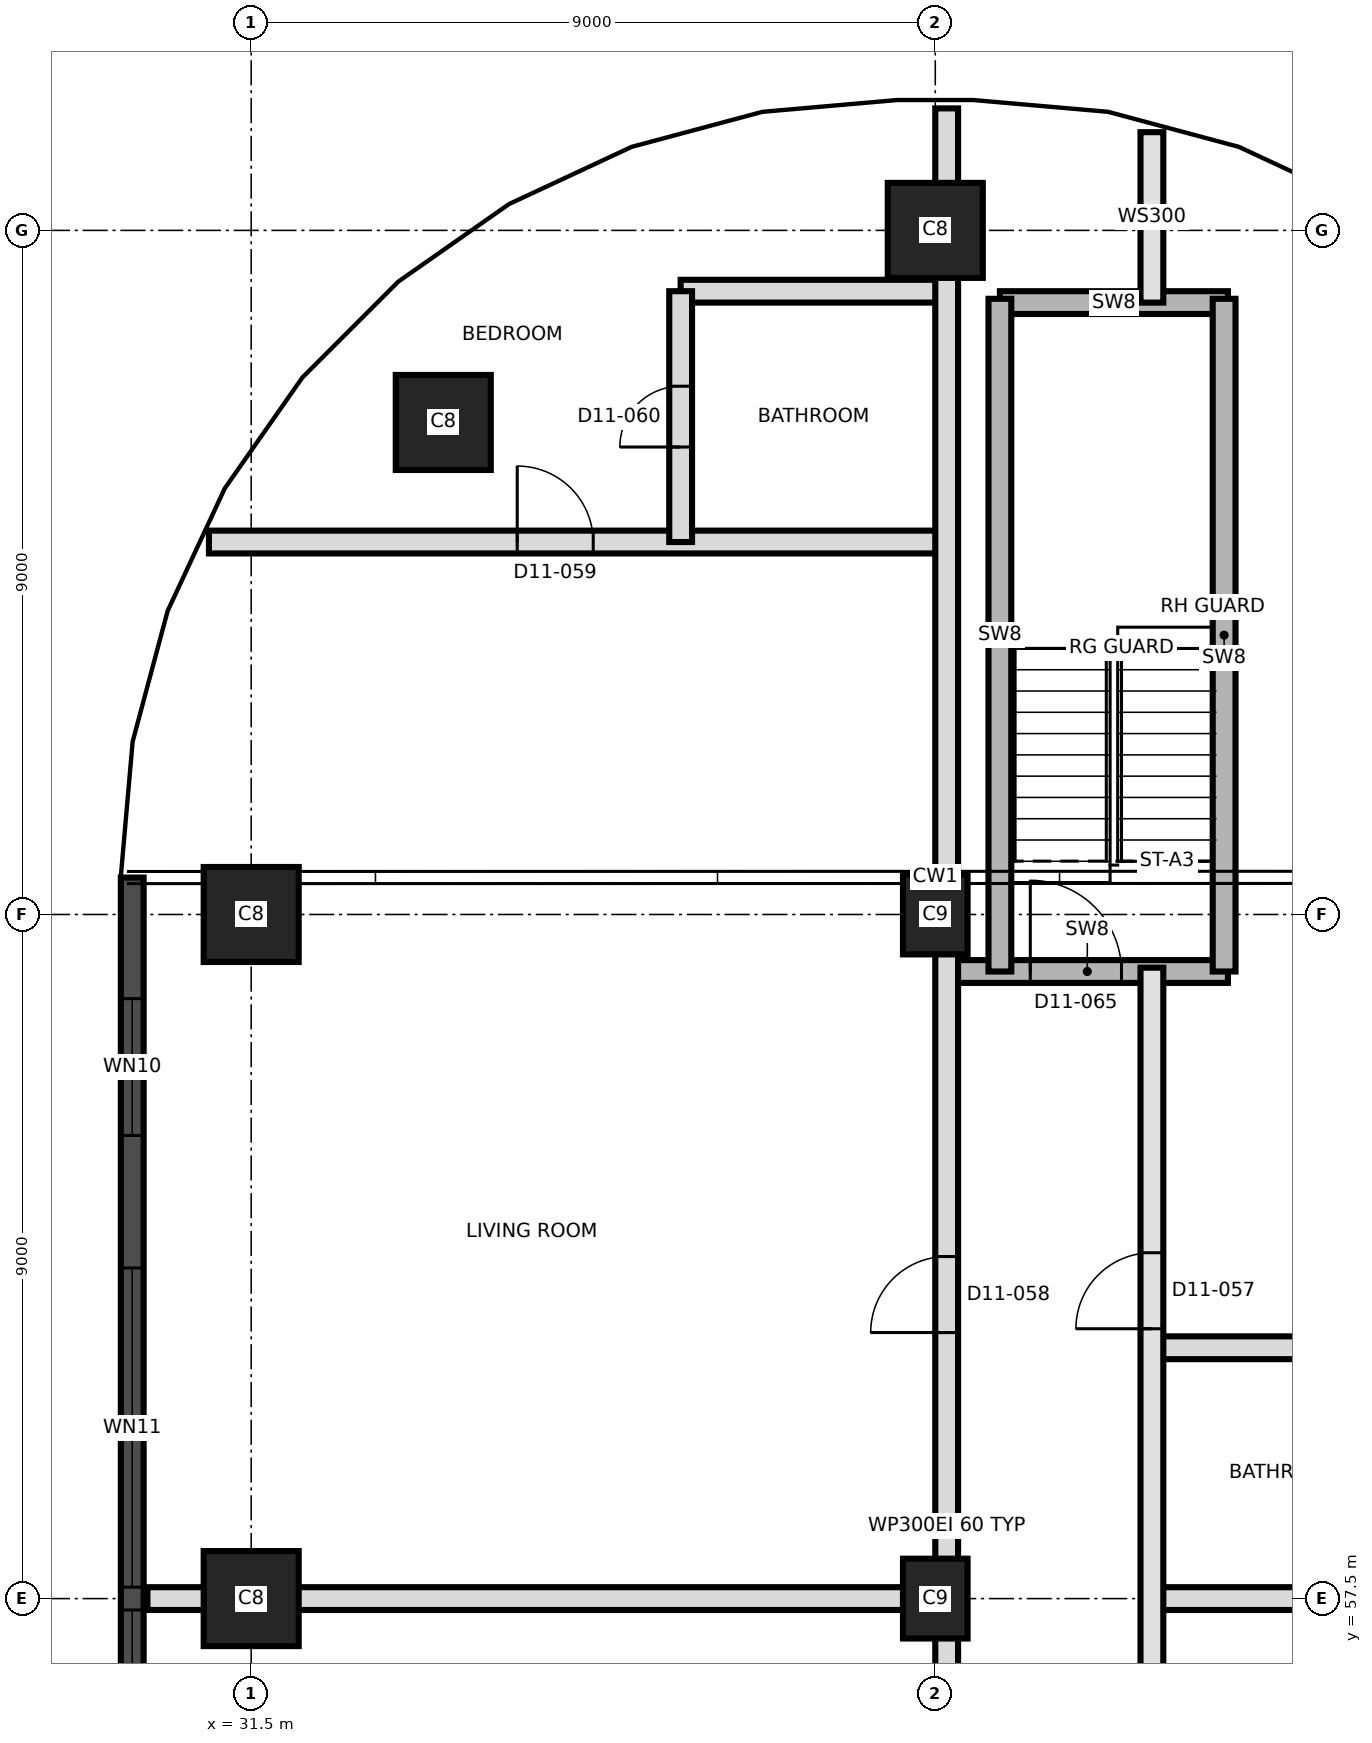
"""IFC4 building model, lengths in metres.
Left out: names, types, materials, properties, quantities, classifications, styles, units other than length and angle.
Written with IfcOpenShell. Run it as: python <this file> out.ifc"""

import sys

from ifc_helpers import new_model, si_unit, direction, frame, frame_2d, origin, origin_2d, place, context, subcontext, project, spatial, rectangle, extrude, element, fill, save


model = new_model("IFC4")
c1 = context("Model", 3, precision=1e-05, world=origin(), true_north=direction((0.0, 1.0)))
c2 = subcontext(c1, "Body", "Model", "MODEL_VIEW")
j1 = project(units=[si_unit("LENGTHUNIT", "METRE"), si_unit("PLANEANGLEUNIT", "RADIAN")], contexts=[c1])
p1 = place(None, origin())
s1 = spatial("IfcSite", under=j1, at=p1, CompositionType="ELEMENT")
p2 = place(p1, origin())
s2 = spatial("IfcBuilding", under=s1, at=p2, CompositionType="ELEMENT")
p3 = place(p2, frame((0.0, 0.0, 131.5)))
s3 = spatial("IfcBuildingStorey", under=s2, at=p3, CompositionType="ELEMENT", Elevation=131.5)
p4 = place(p3, frame((31.5, 57.5, 0.0), z_axis=(0.0, 0.0, 1.0), x_axis=(1.0, 0.0, 0.0)))
e1 = element("IfcColumn", 1, at=p4, inside=s3, PredefinedType="COLUMN", context=c2, shape_type="SweptSolid", body=[
    extrude(rectangle(XDim=1.25, YDim=1.25, at=origin_2d()), origin(), (0.0, 0.0, 1.0), 3.7),
])
p5 = place(p3, frame((40.5, 57.5, 0.0), z_axis=(0.0, 0.0, 1.0), x_axis=(0.0, 1.0, 0.0)))
e2 = element("IfcColumn", 2, at=p5, inside=s3, PredefinedType="COLUMN", context=c2, shape_type="SweptSolid", body=[
    extrude(rectangle(XDim=1.05, YDim=0.85, at=origin_2d()), origin(), (0.0, 0.0, 1.0), 3.7),
])
p6 = place(p3, frame((31.5, 66.5, 0.0), z_axis=(0.0, 0.0, 1.0), x_axis=(1.0, 0.0, 0.0)))
e3 = element("IfcColumn", 3, at=p6, inside=s3, PredefinedType="COLUMN", context=c2, shape_type="SweptSolid", body=[
    extrude(rectangle(XDim=1.25, YDim=1.25, at=origin_2d()), origin(), (0.0, 0.0, 1.0), 3.7),
])
p7 = place(p3, frame((40.5, 66.5, 0.0), z_axis=(0.0, 0.0, 1.0), x_axis=(0.0, 1.0, 0.0)))
e4 = element("IfcColumn", 4, at=p7, inside=s3, PredefinedType="COLUMN", context=c2, shape_type="SweptSolid", body=[
    extrude(rectangle(XDim=1.05, YDim=0.85, at=origin_2d()), origin(), (0.0, 0.0, 1.0), 3.7),
])
for number, where, z_axis, x_axis in (
    (5, (34.027, 72.973, 0.0), (0.0, 0.0, 1.0), (1.0, 0.0, 0.0)),
    (6, (40.5, 75.5, 0.0), (0.0, 0.0, 1.0), (1.0, 0.0, 0.0)),
):
    element("IfcColumn", number, at=place(p3, frame(where, z_axis=z_axis, x_axis=x_axis)), inside=s3, PredefinedType="COLUMN", context=c2, shape_type="SweptSolid", body=[
        extrude(rectangle(XDim=1.25, YDim=1.25, at=origin_2d()), origin(), (0.0, 0.0, 1.0), 3.7),
    ])
p8 = place(p3, frame((29.935, 66.986, 0.0), z_axis=(0.0, 0.0, 1.0), x_axis=(0.0, -1.0, 0.0)))
e7 = element("IfcWall", 7, at=p8, inside=s3, PredefinedType="SOLIDWALL", context=c2, shape_type="SweptSolid", body=[
    extrude(rectangle(XDim=32.976, YDim=0.3, at=frame_2d((16.488, 0.0))), origin(), (0.0, 0.0, 1.0), 3.4),
])
p9 = place(p8, frame((1.593, 0.0, 0.3)))
e8 = element("IfcOpeningElement", 8, at=p9, cuts=e7, PredefinedType="OPENING", context=c2, shape_type="SweptSolid", body=[
    extrude(rectangle(XDim=1.8, YDim=2.4, at=frame_2d((0.9, 1.2))), frame((0.0, 0.16, 0.0), z_axis=(0.0, -1.0, 0.0), x_axis=(1.0, 0.0, 0.0)), (0.0, 0.0, 1.0), 0.32),
])
p10 = place(p8, frame((5.136, 0.0, 0.9)))
e9 = element("IfcOpeningElement", 9, at=p10, cuts=e7, PredefinedType="OPENING", context=c2, shape_type="SweptSolid", body=[
    extrude(rectangle(XDim=4.2, YDim=1.5, at=frame_2d((2.1, 0.75))), frame((0.0, 0.16, 0.0), z_axis=(0.0, -1.0, 0.0), x_axis=(1.0, 0.0, 0.0)), (0.0, 0.0, 1.0), 0.32),
])
p11 = place(p8, frame((9.636, 0.0, 0.9)))
e10 = element("IfcOpeningElement", 10, at=p11, cuts=e7, PredefinedType="OPENING", context=c2, shape_type="SweptSolid", body=[
    extrude(rectangle(XDim=4.2, YDim=1.5, at=frame_2d((2.1, 0.75))), frame((0.0, 0.16, 0.0), z_axis=(0.0, -1.0, 0.0), x_axis=(1.0, 0.0, 0.0)), (0.0, 0.0, 1.0), 0.32),
])
p12 = place(p8, frame((14.136, 0.0, 0.9)))
e11 = element("IfcOpeningElement", 11, at=p12, cuts=e7, PredefinedType="OPENING", context=c2, shape_type="SweptSolid", body=[
    extrude(rectangle(XDim=4.2, YDim=1.5, at=frame_2d((2.1, 0.75))), frame((0.0, 0.16, 0.0), z_axis=(0.0, -1.0, 0.0), x_axis=(1.0, 0.0, 0.0)), (0.0, 0.0, 1.0), 0.32),
])
p13 = place(p8, frame((18.636, 0.0, 0.9)))
e12 = element("IfcOpeningElement", 12, at=p13, cuts=e7, PredefinedType="OPENING", context=c2, shape_type="SweptSolid", body=[
    extrude(rectangle(XDim=4.2, YDim=1.5, at=frame_2d((2.1, 0.75))), frame((0.0, 0.16, 0.0), z_axis=(0.0, -1.0, 0.0), x_axis=(1.0, 0.0, 0.0)), (0.0, 0.0, 1.0), 0.32),
])
p14 = place(p8, frame((23.136, 0.0, 0.9)))
e13 = element("IfcOpeningElement", 13, at=p14, cuts=e7, PredefinedType="OPENING", context=c2, shape_type="SweptSolid", body=[
    extrude(rectangle(XDim=4.2, YDim=1.5, at=frame_2d((2.1, 0.75))), frame((0.0, 0.16, 0.0), z_axis=(0.0, -1.0, 0.0), x_axis=(1.0, 0.0, 0.0)), (0.0, 0.0, 1.0), 0.32),
])
p15 = place(p8, frame((29.331, 0.0, 0.3)))
e14 = element("IfcOpeningElement", 14, at=p15, cuts=e7, PredefinedType="OPENING", context=c2, shape_type="SweptSolid", body=[
    extrude(rectangle(XDim=1.8, YDim=2.4, at=frame_2d((0.9, 1.2))), frame((0.0, 0.16, 0.0), z_axis=(0.0, -1.0, 0.0), x_axis=(1.0, 0.0, 0.0)), (0.0, 0.0, 1.0), 0.32),
])
p16 = place(p3, frame((30.135, 57.5, 0.0), z_axis=(0.0, 0.0, 1.0), x_axis=(1.0, 0.0, 0.0)))
e15 = element("IfcWall", 15, at=p16, inside=s3, PredefinedType="PARTITIONING", context=c2, shape_type="SweptSolid", body=[
    extrude(rectangle(XDim=10.515, YDim=0.3, at=frame_2d((5.257, 0.0))), origin(), (0.0, 0.0, 1.0), 3.35),
])
p17 = place(p3, frame((43.35, 57.5, 0.0), z_axis=(0.0, 0.0, 1.0), x_axis=(1.0, 0.0, 0.0)))
e16 = element("IfcWall", 16, at=p17, inside=s3, PredefinedType="PARTITIONING", context=c2, shape_type="SweptSolid", body=[
    extrude(rectangle(XDim=7.695, YDim=0.3, at=frame_2d((3.847, 0.0))), origin(), (0.0, 0.0, 1.0), 3.35),
])
p18 = place(p3, frame((43.35, 60.8, 0.0), z_axis=(0.0, 0.0, 1.0), x_axis=(1.0, 0.0, 0.0)))
e17 = element("IfcWall", 17, at=p18, inside=s3, PredefinedType="PARTITIONING", context=c2, shape_type="SweptSolid", body=[
    extrude(rectangle(XDim=3.5, YDim=0.3, at=frame_2d((1.75, 0.0))), origin(), (0.0, 0.0, 1.0), 3.4),
])
p19 = place(p3, frame((40.65, 65.75, 0.0), z_axis=(0.0, 0.0, 1.0), x_axis=(1.0, 0.0, 0.0)))
e18 = element("IfcWall", 18, at=p19, inside=s3, PredefinedType="SHEAR", context=c2, shape_type="SweptSolid", body=[
    extrude(rectangle(XDim=3.7, YDim=0.3, at=frame_2d((1.85, 0.0))), origin(), (0.0, 0.0, 1.0), 3.4),
])
p20 = place(p19, frame((1.1, 0.0, 0.0)))
e19 = element("IfcOpeningElement", 19, at=p20, cuts=e18, PredefinedType="OPENING", context=c2, shape_type="SweptSolid", body=[
    extrude(rectangle(XDim=1.2, YDim=2.1, at=frame_2d((0.6, 1.05))), frame((0.0, 0.16, 0.0), z_axis=(0.0, -1.0, 0.0), x_axis=(1.0, 0.0, 0.0)), (0.0, 0.0, 1.0), 0.32),
])
p21 = place(p3, frame((30.944, 71.4, 0.0), z_axis=(0.0, 0.0, 1.0), x_axis=(1.0, 0.0, 0.0)))
e20 = element("IfcWall", 20, at=p21, inside=s3, PredefinedType="PARTITIONING", context=c2, shape_type="SweptSolid", body=[
    extrude(rectangle(XDim=9.706, YDim=0.3, at=frame_2d((4.853, 0.0))), origin(), (0.0, 0.0, 1.0), 3.35),
])
p22 = place(p21, frame((4.056, 0.0, 0.0)))
e21 = element("IfcOpeningElement", 21, at=p22, cuts=e20, PredefinedType="OPENING", context=c2, shape_type="SweptSolid", body=[
    extrude(rectangle(XDim=1.0, YDim=2.1, at=frame_2d((0.5, 1.05))), frame((0.0, 0.16, 0.0), z_axis=(0.0, -1.0, 0.0), x_axis=(1.0, 0.0, 0.0)), (0.0, 0.0, 1.0), 0.32),
])
p23 = place(p3, frame((41.35, 74.55, 0.0), z_axis=(0.0, 0.0, 1.0), x_axis=(1.0, 0.0, 0.0)))
e22 = element("IfcWall", 22, at=p23, inside=s3, PredefinedType="SHEAR", context=c2, shape_type="SweptSolid", body=[
    extrude(rectangle(XDim=3.0, YDim=0.3, at=frame_2d((1.5, 0.0))), origin(), (0.0, 0.0, 1.0), 3.4),
])
p24 = place(p3, frame((37.15, 74.7, 0.0), z_axis=(0.0, 0.0, 1.0), x_axis=(1.0, 0.0, 0.0)))
e23 = element("IfcWall", 23, at=p24, inside=s3, PredefinedType="PARTITIONING", context=c2, shape_type="SweptSolid", body=[
    extrude(rectangle(XDim=3.5, YDim=0.3, at=frame_2d((1.75, 0.0))), origin(), (0.0, 0.0, 1.0), 3.4),
])
p25 = place(p3, frame((37.15, 71.4, 0.0), z_axis=(0.0, 0.0, 1.0), x_axis=(0.0, 1.0, 0.0)))
e24 = element("IfcWall", 24, at=p25, inside=s3, PredefinedType="PARTITIONING", context=c2, shape_type="SweptSolid", body=[
    extrude(rectangle(XDim=3.3, YDim=0.3, at=frame_2d((1.65, 0.0))), origin(), (0.0, 0.0, 1.0), 3.4),
])
p26 = place(p25, frame((1.25, 0.0, 0.0)))
e25 = element("IfcOpeningElement", 25, at=p26, cuts=e24, PredefinedType="OPENING", context=c2, shape_type="SweptSolid", body=[
    extrude(rectangle(XDim=0.8, YDim=2.1, at=frame_2d((0.4, 1.05))), frame((0.0, 0.16, 0.0), z_axis=(0.0, -1.0, 0.0), x_axis=(1.0, 0.0, 0.0)), (0.0, 0.0, 1.0), 0.32),
])
p27 = place(p3, frame((40.65, 39.8, 0.0), z_axis=(0.0, 0.0, 1.0), x_axis=(0.0, 1.0, 0.0)))
e26 = element("IfcWall", 26, at=p27, inside=s3, PredefinedType="PARTITIONING", context=c2, shape_type="SweptSolid", body=[
    extrude(rectangle(XDim=37.305, YDim=0.3, at=frame_2d((18.652, 0.0))), origin(), (0.0, 0.0, 1.0), 3.35),
])
p28 = place(p27, frame((0.85, 0.0, 0.0)))
e27 = element("IfcOpeningElement", 27, at=p28, cuts=e26, PredefinedType="OPENING", context=c2, shape_type="SweptSolid", body=[
    extrude(rectangle(XDim=1.0, YDim=2.1, at=frame_2d((0.5, 1.05))), frame((0.0, 0.16, 0.0), z_axis=(0.0, -1.0, 0.0), x_axis=(1.0, 0.0, 0.0)), (0.0, 0.0, 1.0), 0.32),
])
p29 = place(p27, frame((6.7, 0.0, 0.0)))
e28 = element("IfcOpeningElement", 28, at=p29, cuts=e26, PredefinedType="OPENING", context=c2, shape_type="SweptSolid", body=[
    extrude(rectangle(XDim=1.0, YDim=2.1, at=frame_2d((0.5, 1.05))), frame((0.0, 0.16, 0.0), z_axis=(0.0, -1.0, 0.0), x_axis=(1.0, 0.0, 0.0)), (0.0, 0.0, 1.0), 0.32),
])
p30 = place(p27, frame((14.35, 0.0, 0.0)))
e29 = element("IfcOpeningElement", 29, at=p30, cuts=e26, PredefinedType="OPENING", context=c2, shape_type="SweptSolid", body=[
    extrude(rectangle(XDim=1.0, YDim=2.4, at=frame_2d((0.5, 1.2))), frame((0.0, 0.16, 0.0), z_axis=(0.0, -1.0, 0.0), x_axis=(1.0, 0.0, 0.0)), (0.0, 0.0, 1.0), 0.32),
])
p31 = place(p27, frame((21.2, 0.0, 0.0)))
e30 = element("IfcOpeningElement", 30, at=p31, cuts=e26, PredefinedType="OPENING", context=c2, shape_type="SweptSolid", body=[
    extrude(rectangle(XDim=1.0, YDim=2.4, at=frame_2d((0.5, 1.2))), frame((0.0, 0.16, 0.0), z_axis=(0.0, -1.0, 0.0), x_axis=(1.0, 0.0, 0.0)), (0.0, 0.0, 1.0), 0.32),
])
p32 = place(p3, frame((41.35, 65.75, 0.0), z_axis=(0.0, 0.0, 1.0), x_axis=(0.0, 1.0, 0.0)))
e31 = element("IfcWall", 31, at=p32, inside=s3, PredefinedType="SHEAR", context=c2, shape_type="SweptSolid", body=[
    extrude(rectangle(XDim=8.85, YDim=0.3, at=frame_2d((4.425, 0.0))), origin(), (0.0, 0.0, 1.0), 3.4),
])
p33 = place(p3, frame((43.35, 39.8, 0.0), z_axis=(0.0, 0.0, 1.0), x_axis=(0.0, 1.0, 0.0)))
e32 = element("IfcWall", 32, at=p33, inside=s3, PredefinedType="SOLIDWALL", context=c2, shape_type="SweptSolid", body=[
    extrude(rectangle(XDim=26.0, YDim=0.3, at=frame_2d((13.0, 0.0))), origin(), (0.0, 0.0, 1.0), 3.4),
])
p34 = place(p33, frame((1.4, 0.0, 0.0)))
e33 = element("IfcOpeningElement", 33, at=p34, cuts=e32, PredefinedType="OPENING", context=c2, shape_type="SweptSolid", body=[
    extrude(rectangle(XDim=1.2, YDim=2.1, at=frame_2d((0.6, 1.05))), frame((0.0, 0.16, 0.0), z_axis=(0.0, -1.0, 0.0), x_axis=(1.0, 0.0, 0.0)), (0.0, 0.0, 1.0), 0.32),
])
p35 = place(p33, frame((4.65, 0.0, 0.0)))
e34 = element("IfcOpeningElement", 34, at=p35, cuts=e32, PredefinedType="OPENING", context=c2, shape_type="SweptSolid", body=[
    extrude(rectangle(XDim=1.0, YDim=2.1, at=frame_2d((0.5, 1.05))), frame((0.0, 0.16, 0.0), z_axis=(0.0, -1.0, 0.0), x_axis=(1.0, 0.0, 0.0)), (0.0, 0.0, 1.0), 0.32),
])
p36 = place(p33, frame((9.835, 0.0, 0.0)))
e35 = element("IfcOpeningElement", 35, at=p36, cuts=e32, PredefinedType="OPENING", context=c2, shape_type="SweptSolid", body=[
    extrude(rectangle(XDim=1.2, YDim=2.1, at=frame_2d((0.6, 1.05))), frame((0.0, 0.16, 0.0), z_axis=(0.0, -1.0, 0.0), x_axis=(1.0, 0.0, 0.0)), (0.0, 0.0, 1.0), 0.32),
])
p37 = place(p33, frame((13.085, 0.0, 0.0)))
e36 = element("IfcOpeningElement", 36, at=p37, cuts=e32, PredefinedType="OPENING", context=c2, shape_type="SweptSolid", body=[
    extrude(rectangle(XDim=1.0, YDim=2.1, at=frame_2d((0.5, 1.05))), frame((0.0, 0.16, 0.0), z_axis=(0.0, -1.0, 0.0), x_axis=(1.0, 0.0, 0.0)), (0.0, 0.0, 1.0), 0.32),
])
p38 = place(p33, frame((21.25, 0.0, 0.0)))
e37 = element("IfcOpeningElement", 37, at=p38, cuts=e32, PredefinedType="OPENING", context=c2, shape_type="SweptSolid", body=[
    extrude(rectangle(XDim=1.0, YDim=2.4, at=frame_2d((0.5, 1.2))), frame((0.0, 0.16, 0.0), z_axis=(0.0, -1.0, 0.0), x_axis=(1.0, 0.0, 0.0)), (0.0, 0.0, 1.0), 0.32),
])
p39 = place(p3, frame((43.35, 74.55, 0.0), z_axis=(0.0, 0.0, 1.0), x_axis=(0.0, 1.0, 0.0)))
e38 = element("IfcWall", 38, at=p39, inside=s3, PredefinedType="SOLIDWALL", context=c2, shape_type="SweptSolid", body=[
    extrude(rectangle(XDim=2.242, YDim=0.3, at=frame_2d((1.121, 0.0))), origin(), (0.0, 0.0, 1.0), 3.35),
])
p40 = place(p3, frame((44.3, 65.75, 0.0), z_axis=(0.0, 0.0, 1.0), x_axis=(0.0, 1.0, 0.0)))
e39 = element("IfcWall", 39, at=p40, inside=s3, PredefinedType="SHEAR", context=c2, shape_type="SweptSolid", body=[
    extrude(rectangle(XDim=8.85, YDim=0.3, at=frame_2d((4.425, 0.0))), origin(), (0.0, 0.0, 1.0), 3.4),
])
p41 = place(p9, origin())
e40 = element("IfcWindow", 40, at=p41, inside=s3, PartitioningType="SINGLE_PANEL", PredefinedType="WINDOW", context=c2, shape_type="SweptSolid", body=[
    extrude(rectangle(XDim=1.8, YDim=2.4, at=frame_2d((0.9, 1.2))), frame((0.0, 0.03, 0.0), z_axis=(0.0, -1.0, 0.0), x_axis=(1.0, 0.0, 0.0)), (0.0, 0.0, 1.0), 0.06),
])
fill(e8, e40)
p42 = place(p10, origin())
e41 = element("IfcWindow", 41, at=p42, inside=s3, PartitioningType="SINGLE_PANEL", PredefinedType="WINDOW", context=c2, shape_type="SweptSolid", body=[
    extrude(rectangle(XDim=4.2, YDim=1.5, at=frame_2d((2.1, 0.75))), frame((0.0, 0.03, 0.0), z_axis=(0.0, -1.0, 0.0), x_axis=(1.0, 0.0, 0.0)), (0.0, 0.0, 1.0), 0.06),
])
fill(e9, e41)
p43 = place(p11, origin())
e42 = element("IfcWindow", 42, at=p43, inside=s3, PartitioningType="SINGLE_PANEL", PredefinedType="WINDOW", context=c2, shape_type="SweptSolid", body=[
    extrude(rectangle(XDim=4.2, YDim=1.5, at=frame_2d((2.1, 0.75))), frame((0.0, 0.03, 0.0), z_axis=(0.0, -1.0, 0.0), x_axis=(1.0, 0.0, 0.0)), (0.0, 0.0, 1.0), 0.06),
])
fill(e10, e42)
p44 = place(p38, origin())
e43 = element("IfcDoor", 43, at=p44, inside=s3, OperationType="SINGLE_SWING_RIGHT", PredefinedType="DOOR", context=c2, shape_type="SweptSolid", body=[
    extrude(rectangle(XDim=1.0, YDim=2.4, at=frame_2d((0.5, 1.2))), frame((0.0, 0.025, 0.0), z_axis=(0.0, -1.0, 0.0), x_axis=(1.0, 0.0, 0.0)), (0.0, 0.0, 1.0), 0.05),
])
fill(e37, e43)
p45 = place(p31, origin())
e44 = element("IfcDoor", 44, at=p45, inside=s3, OperationType="SINGLE_SWING_LEFT", PredefinedType="DOOR", context=c2, shape_type="SweptSolid", body=[
    extrude(rectangle(XDim=1.0, YDim=2.4, at=frame_2d((0.5, 1.2))), frame((0.0, 0.025, 0.0), z_axis=(0.0, -1.0, 0.0), x_axis=(1.0, 0.0, 0.0)), (0.0, 0.0, 1.0), 0.05),
])
fill(e30, e44)
p46 = place(p22, origin())
e45 = element("IfcDoor", 45, at=p46, inside=s3, OperationType="SINGLE_SWING_RIGHT", PredefinedType="DOOR", context=c2, shape_type="SweptSolid", body=[
    extrude(rectangle(XDim=1.0, YDim=2.1, at=frame_2d((0.5, 1.05))), frame((0.0, 0.025, 0.0), z_axis=(0.0, -1.0, 0.0), x_axis=(1.0, 0.0, 0.0)), (0.0, 0.0, 1.0), 0.05),
])
fill(e21, e45)
p47 = place(p26, origin())
e46 = element("IfcDoor", 46, at=p47, inside=s3, OperationType="SINGLE_SWING_LEFT", PredefinedType="DOOR", context=c2, shape_type="SweptSolid", body=[
    extrude(rectangle(XDim=0.8, YDim=2.1, at=frame_2d((0.4, 1.05))), frame((0.0, 0.025, 0.0), z_axis=(0.0, -1.0, 0.0), x_axis=(1.0, 0.0, 0.0)), (0.0, 0.0, 1.0), 0.05),
])
fill(e25, e46)
p48 = place(p20, origin())
e47 = element("IfcDoor", 47, at=p48, inside=s3, OperationType="SINGLE_SWING_RIGHT", PredefinedType="DOOR", context=c2, shape_type="SweptSolid", body=[
    extrude(rectangle(XDim=1.2, YDim=2.1, at=frame_2d((0.6, 1.05))), frame((0.0, 0.025, 0.0), z_axis=(0.0, -1.0, 0.0), x_axis=(1.0, 0.0, 0.0)), (0.0, 0.0, 1.0), 0.05),
])
fill(e19, e47)
save(model, sys.argv[1])
